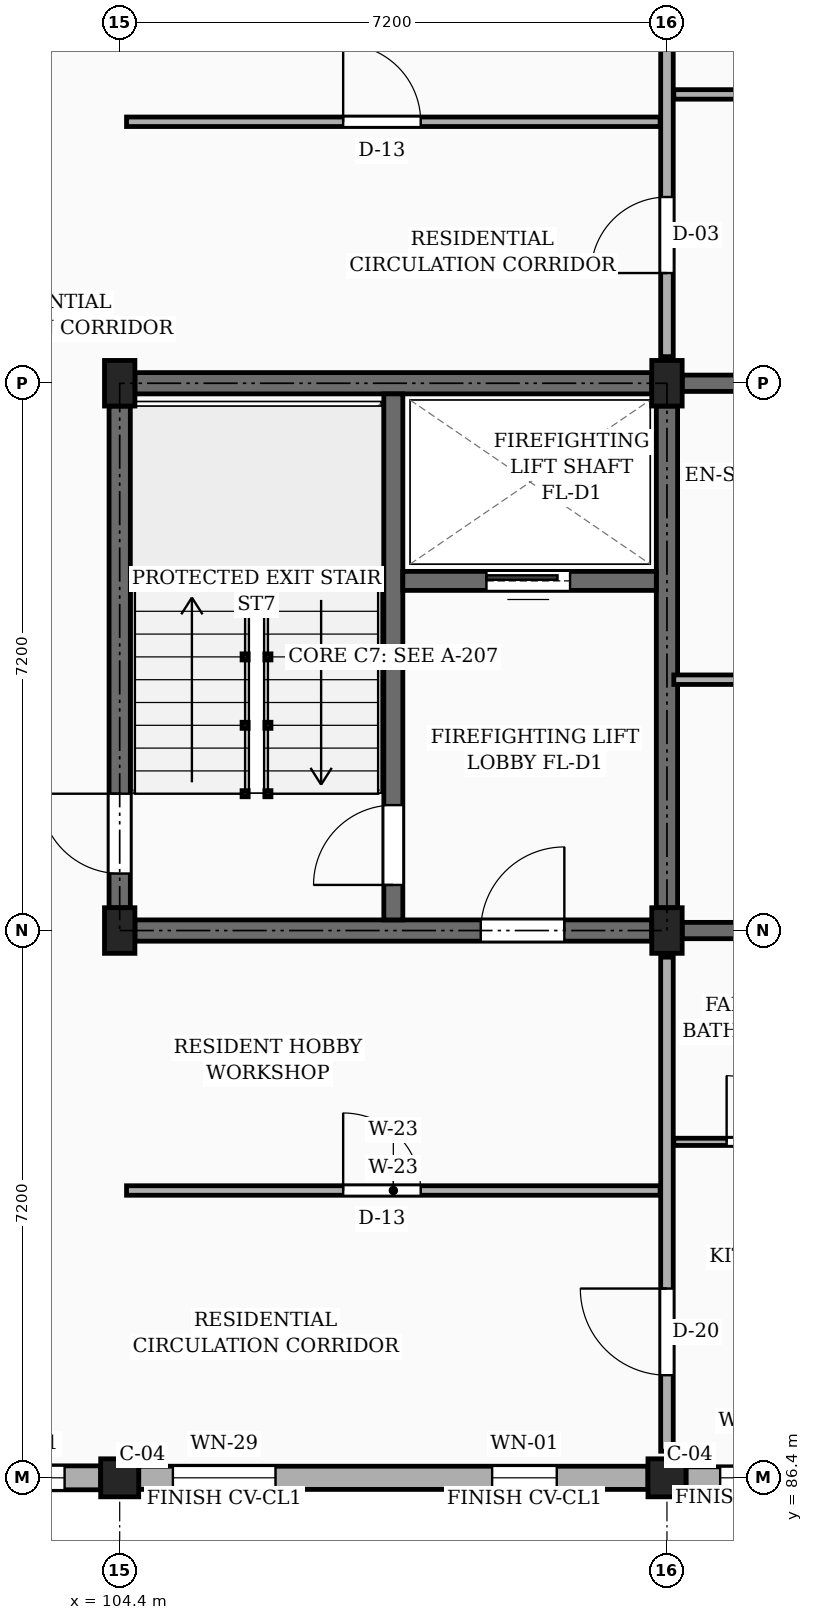
"""IFC4 building model, lengths in metres.
Left out: names, types, materials, properties, quantities, classifications, styles, units other than length and angle.
Written with IfcOpenShell. Run it as: python <this file> out.ifc"""

import sys

from ifc_helpers import new_model, si_unit, direction, frame, frame_2d, origin, origin_2d, place, context, subcontext, project, spatial, rectangle, extrude, element, fill, save


model = new_model("IFC4")
c1 = context("Model", 3, precision=1e-05, world=origin(), true_north=direction((0.0, 1.0)))
c2 = subcontext(c1, "Body", "Model", "MODEL_VIEW")
j1 = project(units=[si_unit("LENGTHUNIT", "METRE"), si_unit("PLANEANGLEUNIT", "RADIAN")], contexts=[c1])
p1 = place(None, origin())
s1 = spatial("IfcSite", under=j1, at=p1, CompositionType="ELEMENT")
p2 = place(p1, origin())
s2 = spatial("IfcBuilding", under=s1, at=p2, CompositionType="ELEMENT")
p3 = place(p2, frame((0.0, 0.0, 26.55)))
s3 = spatial("IfcBuildingStorey", under=s2, at=p3, CompositionType="ELEMENT", Elevation=26.55)
p4 = place(p3, frame((104.4, 86.4, 0.0), z_axis=(0.0, 0.0, 1.0), x_axis=(1.0, 0.0, 0.0)))
e1 = element("IfcColumn", 1, at=p4, inside=s3, PredefinedType="COLUMN", context=c2, shape_type="SweptSolid", body=[
    extrude(rectangle(XDim=0.5, YDim=0.5, at=origin_2d()), origin(), (0.0, 0.0, 1.0), 3.15),
])
for number, where, z_axis, x_axis in (
    (2, (104.4, 93.6, 0.0), (0.0, 0.0, 1.0), (1.0, 0.0, 0.0)),
    (3, (104.4, 100.8, 0.0), (0.0, 0.0, 1.0), (1.0, 0.0, 0.0)),
):
    element("IfcColumn", number, at=place(p3, frame(where, z_axis=z_axis, x_axis=x_axis)), inside=s3, PredefinedType="COLUMN", context=c2, shape_type="SweptSolid", body=[
        extrude(rectangle(XDim=0.4, YDim=0.6, at=origin_2d()), origin(), (0.0, 0.0, 1.0), 3.15),
    ])
p5 = place(p3, frame((111.6, 86.4, 0.0), z_axis=(0.0, 0.0, 1.0), x_axis=(1.0, 0.0, 0.0)))
e4 = element("IfcColumn", 4, at=p5, inside=s3, PredefinedType="COLUMN", context=c2, shape_type="SweptSolid", body=[
    extrude(rectangle(XDim=0.5, YDim=0.5, at=origin_2d()), origin(), (0.0, 0.0, 1.0), 3.15),
])
for number, where, z_axis, x_axis in (
    (5, (111.6, 93.6, 0.0), (0.0, 0.0, 1.0), (1.0, 0.0, 0.0)),
    (6, (111.6, 100.8, 0.0), (0.0, 0.0, 1.0), (1.0, 0.0, 0.0)),
):
    element("IfcColumn", number, at=place(p3, frame(where, z_axis=z_axis, x_axis=x_axis)), inside=s3, PredefinedType="COLUMN", context=c2, shape_type="SweptSolid", body=[
        extrude(rectangle(XDim=0.4, YDim=0.6, at=origin_2d()), origin(), (0.0, 0.0, 1.0), 3.15),
    ])
p6 = place(p3, frame((111.8, 93.6, 0.0), z_axis=(0.0, 0.0, 1.0), x_axis=(1.0, 0.0, 0.0)))
e7 = element("IfcWall", 7, at=p6, inside=s3, PredefinedType="SOLIDWALL", context=c2, shape_type="SweptSolid", body=[
    extrude(rectangle(XDim=6.75, YDim=0.215, at=frame_2d((3.375, 0.0))), origin(), (0.0, 0.0, 1.0), 2.19),
])
p7 = place(p6, frame((4.35, 0.0, 0.0)))
e8 = element("IfcOpeningElement", 8, at=p7, cuts=e7, PredefinedType="OPENING", context=c2, shape_type="SweptSolid", body=[
    extrude(rectangle(XDim=0.98, YDim=2.12, at=frame_2d((0.49, 1.06))), frame((0.0, 0.118, 0.0), z_axis=(0.0, -1.0, 0.0), x_axis=(1.0, 0.0, 0.0)), (0.0, 0.0, 1.0), 0.235),
])
p8 = place(p3, frame((111.8, 100.8, 0.0), z_axis=(0.0, 0.0, 1.0), x_axis=(1.0, 0.0, 0.0)))
e9 = element("IfcWall", 9, at=p8, inside=s3, PredefinedType="SOLIDWALL", context=c2, shape_type="SweptSolid", body=[
    extrude(rectangle(XDim=6.75, YDim=0.215, at=frame_2d((3.375, 0.0))), origin(), (0.0, 0.0, 1.0), 2.19),
])
p9 = place(p3, frame((97.45, 86.4, 0.0), z_axis=(0.0, 0.0, 1.0), x_axis=(1.0, 0.0, 0.0)))
e10 = element("IfcWall", 10, at=p9, inside=s3, PredefinedType="SOLIDWALL", context=c2, shape_type="SweptSolid", body=[
    extrude(rectangle(XDim=6.7, YDim=0.315, at=frame_2d((3.35, 0.0))), origin(), (0.0, 0.0, 1.0), 2.46),
])
p10 = place(p9, frame((0.96, 0.0, 0.78)))
e11 = element("IfcOpeningElement", 11, at=p10, cuts=e10, PredefinedType="OPENING", context=c2, shape_type="SweptSolid", body=[
    extrude(rectangle(XDim=1.05, YDim=1.44, at=frame_2d((0.525, 0.72))), frame((0.0, 0.167, 0.0), z_axis=(0.0, -1.0, 0.0), x_axis=(1.0, 0.0, 0.0)), (0.0, 0.0, 1.0), 0.335),
])
p11 = place(p9, frame((3.215, 0.0, 0.78)))
e12 = element("IfcOpeningElement", 12, at=p11, cuts=e10, PredefinedType="OPENING", context=c2, shape_type="SweptSolid", body=[
    extrude(rectangle(XDim=1.25, YDim=1.44, at=frame_2d((0.625, 0.72))), frame((0.0, 0.167, 0.0), z_axis=(0.0, -1.0, 0.0), x_axis=(1.0, 0.0, 0.0)), (0.0, 0.0, 1.0), 0.335),
])
p12 = place(p9, frame((5.185, 0.0, 0.78)))
e13 = element("IfcOpeningElement", 13, at=p12, cuts=e10, PredefinedType="OPENING", context=c2, shape_type="SweptSolid", body=[
    extrude(rectangle(XDim=1.04, YDim=1.26, at=frame_2d((0.52, 0.63))), frame((0.0, 0.167, 0.0), z_axis=(0.0, -1.0, 0.0), x_axis=(1.0, 0.0, 0.0)), (0.0, 0.0, 1.0), 0.335),
])
p13 = place(p3, frame((104.65, 86.4, 0.0), z_axis=(0.0, 0.0, 1.0), x_axis=(1.0, 0.0, 0.0)))
e14 = element("IfcWall", 14, at=p13, inside=s3, PredefinedType="SOLIDWALL", context=c2, shape_type="SweptSolid", body=[
    extrude(rectangle(XDim=6.7, YDim=0.305, at=frame_2d((3.35, 0.0))), origin(), (0.0, 0.0, 1.0), 2.46),
])
p14 = place(p13, frame((0.45, 0.0, 0.78)))
e15 = element("IfcOpeningElement", 15, at=p14, cuts=e14, PredefinedType="OPENING", context=c2, shape_type="SweptSolid", body=[
    extrude(rectangle(XDim=1.35, YDim=1.44, at=frame_2d((0.675, 0.72))), frame((0.0, 0.163, 0.0), z_axis=(0.0, -1.0, 0.0), x_axis=(1.0, 0.0, 0.0)), (0.0, 0.0, 1.0), 0.325),
])
p15 = place(p13, frame((4.65, 0.0, 0.78)))
e16 = element("IfcOpeningElement", 16, at=p15, cuts=e14, PredefinedType="OPENING", context=c2, shape_type="SweptSolid", body=[
    extrude(rectangle(XDim=0.85, YDim=1.15, at=frame_2d((0.425, 0.575))), frame((0.0, 0.163, 0.0), z_axis=(0.0, -1.0, 0.0), x_axis=(1.0, 0.0, 0.0)), (0.0, 0.0, 1.0), 0.325),
])
p16 = place(p3, frame((111.85, 86.4, 0.0), z_axis=(0.0, 0.0, 1.0), x_axis=(1.0, 0.0, 0.0)))
e17 = element("IfcWall", 17, at=p16, inside=s3, PredefinedType="SOLIDWALL", context=c2, shape_type="SweptSolid", body=[
    extrude(rectangle(XDim=6.7, YDim=0.29, at=frame_2d((3.35, 0.0))), origin(), (0.0, 0.0, 1.0), 2.46),
])
p17 = place(p16, frame((0.45, 0.0, 0.78)))
e18 = element("IfcOpeningElement", 18, at=p17, cuts=e17, PredefinedType="OPENING", context=c2, shape_type="SweptSolid", body=[
    extrude(rectangle(XDim=0.85, YDim=1.15, at=frame_2d((0.425, 0.575))), frame((0.0, 0.155, 0.0), z_axis=(0.0, -1.0, 0.0), x_axis=(1.0, 0.0, 0.0)), (0.0, 0.0, 1.0), 0.31),
])
p18 = place(p16, frame((4.65, 0.0, 0.78)))
e19 = element("IfcOpeningElement", 19, at=p18, cuts=e17, PredefinedType="OPENING", context=c2, shape_type="SweptSolid", body=[
    extrude(rectangle(XDim=1.0, YDim=1.15, at=frame_2d((0.5, 0.575))), frame((0.0, 0.155, 0.0), z_axis=(0.0, -1.0, 0.0), x_axis=(1.0, 0.0, 0.0)), (0.0, 0.0, 1.0), 0.31),
])
p19 = place(p3, frame((104.4, 93.9, 0.0), z_axis=(0.0, 0.0, 1.0), x_axis=(0.0, 1.0, 0.0)))
e20 = element("IfcWall", 20, at=p19, inside=s3, PredefinedType="SHEAR", context=c2, shape_type="SweptSolid", body=[
    extrude(rectangle(XDim=6.6, YDim=0.28, at=frame_2d((3.3, 0.0))), origin(), (0.0, 0.0, 1.0), 2.89),
])
p20 = place(p19, frame((0.45, 0.0, 0.0)))
e21 = element("IfcOpeningElement", 21, at=p20, cuts=e20, PredefinedType="OPENING", context=c2, shape_type="SweptSolid", body=[
    extrude(rectangle(XDim=1.05, YDim=2.15, at=frame_2d((0.525, 1.075))), frame((0.0, 0.15, 0.0), z_axis=(0.0, -1.0, 0.0), x_axis=(1.0, 0.0, 0.0)), (0.0, 0.0, 1.0), 0.3),
])
p21 = place(p3, frame((104.6, 100.8, 0.0), z_axis=(0.0, 0.0, 1.0), x_axis=(1.0, 0.0, 0.0)))
e22 = element("IfcWall", 22, at=p21, inside=s3, PredefinedType="SHEAR", context=c2, shape_type="SweptSolid", body=[
    extrude(rectangle(XDim=6.8, YDim=0.28, at=frame_2d((3.4, 0.0))), origin(), (0.0, 0.0, 1.0), 2.89),
])
p22 = place(p3, frame((111.6, 93.9, 0.0), z_axis=(0.0, 0.0, 1.0), x_axis=(0.0, 1.0, 0.0)))
e23 = element("IfcWall", 23, at=p22, inside=s3, PredefinedType="SHEAR", context=c2, shape_type="SweptSolid", body=[
    extrude(rectangle(XDim=6.6, YDim=0.28, at=frame_2d((3.3, 0.0))), origin(), (0.0, 0.0, 1.0), 2.89),
])
p23 = place(p3, frame((104.6, 93.6, 0.0), z_axis=(0.0, 0.0, 1.0), x_axis=(1.0, 0.0, 0.0)))
e24 = element("IfcWall", 24, at=p23, inside=s3, PredefinedType="SHEAR", context=c2, shape_type="SweptSolid", body=[
    extrude(rectangle(XDim=6.8, YDim=0.28, at=frame_2d((3.4, 0.0))), origin(), (0.0, 0.0, 1.0), 2.89),
])
p24 = place(p23, frame((4.55, 0.0, 0.0)))
e25 = element("IfcOpeningElement", 25, at=p24, cuts=e24, PredefinedType="OPENING", context=c2, shape_type="SweptSolid", body=[
    extrude(rectangle(XDim=1.1, YDim=2.15, at=frame_2d((0.55, 1.075))), frame((0.0, 0.15, 0.0), z_axis=(0.0, -1.0, 0.0), x_axis=(1.0, 0.0, 0.0)), (0.0, 0.0, 1.0), 0.3),
])
p25 = place(p3, frame((108.0, 93.74, 0.0), z_axis=(0.0, 0.0, 1.0), x_axis=(0.0, 1.0, 0.0)))
e26 = element("IfcWall", 26, at=p25, inside=s3, PredefinedType="SHEAR", context=c2, shape_type="SweptSolid", body=[
    extrude(rectangle(XDim=6.92, YDim=0.25, at=frame_2d((3.46, 0.0))), origin(), (0.0, 0.0, 1.0), 2.89),
])
p26 = place(p25, frame((0.46, 0.0, 0.0)))
e27 = element("IfcOpeningElement", 27, at=p26, cuts=e26, PredefinedType="OPENING", context=c2, shape_type="SweptSolid", body=[
    extrude(rectangle(XDim=1.05, YDim=2.15, at=frame_2d((0.525, 1.075))), frame((0.0, 0.135, 0.0), z_axis=(0.0, -1.0, 0.0), x_axis=(1.0, 0.0, 0.0)), (0.0, 0.0, 1.0), 0.27),
])
p27 = place(p3, frame((108.125, 98.2, 0.0), z_axis=(0.0, 0.0, 1.0), x_axis=(1.0, 0.0, 0.0)))
e28 = element("IfcWall", 28, at=p27, inside=s3, PredefinedType="SHEAR", context=c2, shape_type="SweptSolid", body=[
    extrude(rectangle(XDim=3.335, YDim=0.25, at=frame_2d((1.667, 0.0))), origin(), (0.0, 0.0, 1.0), 2.89),
])
p28 = place(p27, frame((1.1, 0.0, 0.0)))
e29 = element("IfcOpeningElement", 29, at=p28, cuts=e28, PredefinedType="OPENING", context=c2, shape_type="SweptSolid", body=[
    extrude(rectangle(XDim=1.1, YDim=2.2, at=frame_2d((0.55, 1.1))), frame((0.0, 0.135, 0.0), z_axis=(0.0, -1.0, 0.0), x_axis=(1.0, 0.0, 0.0)), (0.0, 0.0, 1.0), 0.27),
])
p29 = place(p3, frame((111.6, 86.75, 0.0), z_axis=(0.0, 0.0, 1.0), x_axis=(0.0, 1.0, 0.0)))
e30 = element("IfcWall", 30, at=p29, inside=s3, PredefinedType="PARTITIONING", context=c2, shape_type="SweptSolid", body=[
    extrude(rectangle(XDim=6.5, YDim=0.165, at=frame_2d((3.25, 0.0))), origin(), (0.0, 0.0, 1.0), 2.325),
])
p30 = place(p29, frame((1.0, 0.0, 0.0)))
e31 = element("IfcOpeningElement", 31, at=p30, cuts=e30, PredefinedType="OPENING", context=c2, shape_type="SweptSolid", body=[
    extrude(rectangle(XDim=1.14, YDim=2.18, at=frame_2d((0.57, 1.09))), frame((0.0, 0.093, 0.0), z_axis=(0.0, -1.0, 0.0), x_axis=(1.0, 0.0, 0.0)), (0.0, 0.0, 1.0), 0.185),
])
p31 = place(p3, frame((111.6, 101.15, 0.0), z_axis=(0.0, 0.0, 1.0), x_axis=(0.0, 1.0, 0.0)))
e32 = element("IfcWall", 32, at=p31, inside=s3, PredefinedType="PARTITIONING", context=c2, shape_type="SweptSolid", body=[
    extrude(rectangle(XDim=6.5, YDim=0.165, at=frame_2d((3.25, 0.0))), origin(), (0.0, 0.0, 1.0), 2.325),
])
p32 = place(p31, frame((1.1, 0.0, 0.0)))
e33 = element("IfcOpeningElement", 33, at=p32, cuts=e32, PredefinedType="OPENING", context=c2, shape_type="SweptSolid", body=[
    extrude(rectangle(XDim=1.0, YDim=2.15, at=frame_2d((0.5, 1.075))), frame((0.0, 0.093, 0.0), z_axis=(0.0, -1.0, 0.0), x_axis=(1.0, 0.0, 0.0)), (0.0, 0.0, 1.0), 0.185),
])
p33 = place(p3, frame((104.49, 90.18, 0.0), z_axis=(0.0, 0.0, 1.0), x_axis=(1.0, 0.0, 0.0)))
e34 = element("IfcWall", 34, at=p33, inside=s3, PredefinedType="PARTITIONING", context=c2, shape_type="SweptSolid", body=[
    extrude(rectangle(XDim=7.02, YDim=0.125, at=frame_2d((3.51, 0.0))), origin(), (0.0, 0.0, 1.0), 2.325),
])
p34 = place(p33, frame((2.85, 0.0, 0.0)))
e35 = element("IfcOpeningElement", 35, at=p34, cuts=e34, PredefinedType="OPENING", context=c2, shape_type="SweptSolid", body=[
    extrude(rectangle(XDim=1.02, YDim=2.15, at=frame_2d((0.51, 1.075))), frame((0.0, 0.073, 0.0), z_axis=(0.0, -1.0, 0.0), x_axis=(1.0, 0.0, 0.0)), (0.0, 0.0, 1.0), 0.145),
])
p35 = place(p3, frame((111.69, 90.82, 0.0), z_axis=(0.0, 0.0, 1.0), x_axis=(1.0, 0.0, 0.0)))
e36 = element("IfcWall", 36, at=p35, inside=s3, PredefinedType="PARTITIONING", context=c2, shape_type="SweptSolid", body=[
    extrude(rectangle(XDim=2.26, YDim=0.095, at=frame_2d((1.13, 0.0))), origin(), (0.0, 0.0, 1.0), 2.325),
])
p36 = place(p35, frame((0.695, 0.0, 0.0)))
e37 = element("IfcOpeningElement", 37, at=p36, cuts=e36, PredefinedType="OPENING", context=c2, shape_type="SweptSolid", body=[
    extrude(rectangle(XDim=0.87, YDim=2.05, at=frame_2d((0.435, 1.025))), frame((0.0, 0.058, 0.0), z_axis=(0.0, -1.0, 0.0), x_axis=(1.0, 0.0, 0.0)), (0.0, 0.0, 1.0), 0.115),
])
p37 = place(p3, frame((111.69, 96.9, 0.0), z_axis=(0.0, 0.0, 1.0), x_axis=(1.0, 0.0, 0.0)))
e38 = element("IfcWall", 38, at=p37, inside=s3, PredefinedType="PARTITIONING", context=c2, shape_type="SweptSolid", body=[
    extrude(rectangle(XDim=6.935, YDim=0.125, at=frame_2d((3.468, 0.0))), origin(), (0.0, 0.0, 1.0), 2.325),
])
p38 = place(p37, frame((1.1, 0.0, 0.0)))
e39 = element("IfcOpeningElement", 39, at=p38, cuts=e38, PredefinedType="OPENING", context=c2, shape_type="SweptSolid", body=[
    extrude(rectangle(XDim=0.87, YDim=2.05, at=frame_2d((0.435, 1.025))), frame((0.0, 0.073, 0.0), z_axis=(0.0, -1.0, 0.0), x_axis=(1.0, 0.0, 0.0)), (0.0, 0.0, 1.0), 0.145),
])
p39 = place(p37, frame((4.5, 0.0, 0.0)))
e40 = element("IfcOpeningElement", 40, at=p39, cuts=e38, PredefinedType="OPENING", context=c2, shape_type="SweptSolid", body=[
    extrude(rectangle(XDim=0.88, YDim=2.08, at=frame_2d((0.44, 1.04))), frame((0.0, 0.073, 0.0), z_axis=(0.0, -1.0, 0.0), x_axis=(1.0, 0.0, 0.0)), (0.0, 0.0, 1.0), 0.145),
])
p40 = place(p3, frame((104.49, 104.24, 0.0), z_axis=(0.0, 0.0, 1.0), x_axis=(1.0, 0.0, 0.0)))
e41 = element("IfcWall", 41, at=p40, inside=s3, PredefinedType="PARTITIONING", context=c2, shape_type="SweptSolid", body=[
    extrude(rectangle(XDim=7.02, YDim=0.125, at=frame_2d((3.51, 0.0))), origin(), (0.0, 0.0, 1.0), 2.325),
])
p41 = place(p40, frame((2.85, 0.0, 0.0)))
e42 = element("IfcOpeningElement", 42, at=p41, cuts=e41, PredefinedType="OPENING", context=c2, shape_type="SweptSolid", body=[
    extrude(rectangle(XDim=1.02, YDim=2.15, at=frame_2d((0.51, 1.075))), frame((0.0, 0.073, 0.0), z_axis=(0.0, -1.0, 0.0), x_axis=(1.0, 0.0, 0.0)), (0.0, 0.0, 1.0), 0.145),
])
p42 = place(p3, frame((111.69, 104.6, 0.0), z_axis=(0.0, 0.0, 1.0), x_axis=(1.0, 0.0, 0.0)))
e43 = element("IfcWall", 43, at=p42, inside=s3, PredefinedType="PARTITIONING", context=c2, shape_type="SweptSolid", body=[
    extrude(rectangle(XDim=6.935, YDim=0.125, at=frame_2d((3.468, 0.0))), origin(), (0.0, 0.0, 1.0), 2.325),
])
p43 = place(p42, frame((1.1, 0.0, 0.0)))
e44 = element("IfcOpeningElement", 44, at=p43, cuts=e43, PredefinedType="OPENING", context=c2, shape_type="SweptSolid", body=[
    extrude(rectangle(XDim=0.87, YDim=2.05, at=frame_2d((0.435, 1.025))), frame((0.0, 0.073, 0.0), z_axis=(0.0, -1.0, 0.0), x_axis=(1.0, 0.0, 0.0)), (0.0, 0.0, 1.0), 0.145),
])
p44 = place(p42, frame((4.5, 0.0, 0.0)))
e45 = element("IfcOpeningElement", 45, at=p44, cuts=e43, PredefinedType="OPENING", context=c2, shape_type="SweptSolid", body=[
    extrude(rectangle(XDim=0.92, YDim=2.1, at=frame_2d((0.46, 1.05))), frame((0.0, 0.073, 0.0), z_axis=(0.0, -1.0, 0.0), x_axis=(1.0, 0.0, 0.0)), (0.0, 0.0, 1.0), 0.145),
])
p45 = place(p12, origin())
e46 = element("IfcWindow", 46, at=p45, inside=s3, PartitioningType="SINGLE_PANEL", PredefinedType="WINDOW", context=c2, shape_type="SweptSolid", body=[
    extrude(rectangle(XDim=1.04, YDim=1.26, at=frame_2d((0.52, 0.63))), frame((0.0, 0.03, 0.0), z_axis=(0.0, -1.0, 0.0), x_axis=(1.0, 0.0, 0.0)), (0.0, 0.0, 1.0), 0.06),
])
fill(e13, e46)
p46 = place(p14, origin())
e47 = element("IfcWindow", 47, at=p46, inside=s3, PartitioningType="SINGLE_PANEL", PredefinedType="WINDOW", context=c2, shape_type="SweptSolid", body=[
    extrude(rectangle(XDim=1.35, YDim=1.44, at=frame_2d((0.675, 0.72))), frame((0.0, 0.03, 0.0), z_axis=(0.0, -1.0, 0.0), x_axis=(1.0, 0.0, 0.0)), (0.0, 0.0, 1.0), 0.06),
])
fill(e15, e47)
p47 = place(p15, origin())
e48 = element("IfcWindow", 48, at=p47, inside=s3, PartitioningType="SINGLE_PANEL", PredefinedType="WINDOW", context=c2, shape_type="SweptSolid", body=[
    extrude(rectangle(XDim=0.85, YDim=1.15, at=frame_2d((0.425, 0.575))), frame((0.0, 0.03, 0.0), z_axis=(0.0, -1.0, 0.0), x_axis=(1.0, 0.0, 0.0)), (0.0, 0.0, 1.0), 0.06),
])
fill(e16, e48)
p48 = place(p17, origin())
e49 = element("IfcWindow", 49, at=p48, inside=s3, PartitioningType="SINGLE_PANEL", PredefinedType="WINDOW", context=c2, shape_type="SweptSolid", body=[
    extrude(rectangle(XDim=0.85, YDim=1.15, at=frame_2d((0.425, 0.575))), frame((0.0, 0.03, 0.0), z_axis=(0.0, -1.0, 0.0), x_axis=(1.0, 0.0, 0.0)), (0.0, 0.0, 1.0), 0.06),
])
fill(e18, e49)
p49 = place(p20, origin())
e50 = element("IfcDoor", 50, at=p49, inside=s3, OperationType="SINGLE_SWING_RIGHT", PredefinedType="DOOR", context=c2, shape_type="SweptSolid", body=[
    extrude(rectangle(XDim=1.05, YDim=2.15, at=frame_2d((0.525, 1.075))), frame((0.0, 0.025, 0.0), z_axis=(0.0, -1.0, 0.0), x_axis=(1.0, 0.0, 0.0)), (0.0, 0.0, 1.0), 0.05),
])
fill(e21, e50)
p50 = place(p24, frame((1.1, 0.0, 0.0), z_axis=(0.0, 0.0, 1.0), x_axis=(-1.0, 0.0, 0.0)))
e51 = element("IfcDoor", 51, at=p50, inside=s3, OperationType="SINGLE_SWING_RIGHT", PredefinedType="DOOR", context=c2, shape_type="SweptSolid", body=[
    extrude(rectangle(XDim=1.1, YDim=2.15, at=frame_2d((0.55, 1.075))), frame((0.0, 0.025, 0.0), z_axis=(0.0, -1.0, 0.0), x_axis=(1.0, 0.0, 0.0)), (0.0, 0.0, 1.0), 0.05),
])
fill(e25, e51)
p51 = place(p26, origin())
e52 = element("IfcDoor", 52, at=p51, inside=s3, OperationType="SINGLE_SWING_LEFT", PredefinedType="DOOR", context=c2, shape_type="SweptSolid", body=[
    extrude(rectangle(XDim=1.05, YDim=2.15, at=frame_2d((0.525, 1.075))), frame((0.0, 0.025, 0.0), z_axis=(0.0, -1.0, 0.0), x_axis=(1.0, 0.0, 0.0)), (0.0, 0.0, 1.0), 0.05),
])
fill(e27, e52)
p52 = place(p28, origin())
e53 = element("IfcDoor", 53, at=p52, inside=s3, OperationType="SLIDING_TO_LEFT", PredefinedType="DOOR", context=c2, shape_type="SweptSolid", body=[
    extrude(rectangle(XDim=1.1, YDim=2.2, at=frame_2d((0.55, 1.1))), frame((0.0, 0.025, 0.0), z_axis=(0.0, -1.0, 0.0), x_axis=(1.0, 0.0, 0.0)), (0.0, 0.0, 1.0), 0.05),
])
fill(e29, e53)
p53 = place(p30, origin())
e54 = element("IfcDoor", 54, at=p53, inside=s3, OperationType="SINGLE_SWING_RIGHT", PredefinedType="DOOR", context=c2, shape_type="SweptSolid", body=[
    extrude(rectangle(XDim=1.14, YDim=2.18, at=frame_2d((0.57, 1.09))), frame((0.0, 0.025, 0.0), z_axis=(0.0, -1.0, 0.0), x_axis=(1.0, 0.0, 0.0)), (0.0, 0.0, 1.0), 0.05),
])
fill(e31, e54)
p54 = place(p32, origin())
e55 = element("IfcDoor", 55, at=p54, inside=s3, OperationType="SINGLE_SWING_LEFT", PredefinedType="DOOR", context=c2, shape_type="SweptSolid", body=[
    extrude(rectangle(XDim=1.0, YDim=2.15, at=frame_2d((0.5, 1.075))), frame((0.0, 0.025, 0.0), z_axis=(0.0, -1.0, 0.0), x_axis=(1.0, 0.0, 0.0)), (0.0, 0.0, 1.0), 0.05),
])
fill(e33, e55)
p55 = place(p34, origin())
e56 = element("IfcDoor", 56, at=p55, inside=s3, OperationType="SINGLE_SWING_LEFT", PredefinedType="DOOR", context=c2, shape_type="SweptSolid", body=[
    extrude(rectangle(XDim=1.02, YDim=2.15, at=frame_2d((0.51, 1.075))), frame((0.0, 0.025, 0.0), z_axis=(0.0, -1.0, 0.0), x_axis=(1.0, 0.0, 0.0)), (0.0, 0.0, 1.0), 0.05),
])
fill(e35, e56)
p56 = place(p36, origin())
e57 = element("IfcDoor", 57, at=p56, inside=s3, OperationType="SINGLE_SWING_LEFT", PredefinedType="DOOR", context=c2, shape_type="SweptSolid", body=[
    extrude(rectangle(XDim=0.87, YDim=2.05, at=frame_2d((0.435, 1.025))), frame((0.0, 0.025, 0.0), z_axis=(0.0, -1.0, 0.0), x_axis=(1.0, 0.0, 0.0)), (0.0, 0.0, 1.0), 0.05),
])
fill(e37, e57)
p57 = place(p41, origin())
e58 = element("IfcDoor", 58, at=p57, inside=s3, OperationType="SINGLE_SWING_LEFT", PredefinedType="DOOR", context=c2, shape_type="SweptSolid", body=[
    extrude(rectangle(XDim=1.02, YDim=2.15, at=frame_2d((0.51, 1.075))), frame((0.0, 0.025, 0.0), z_axis=(0.0, -1.0, 0.0), x_axis=(1.0, 0.0, 0.0)), (0.0, 0.0, 1.0), 0.05),
])
fill(e42, e58)
save(model, sys.argv[1])
